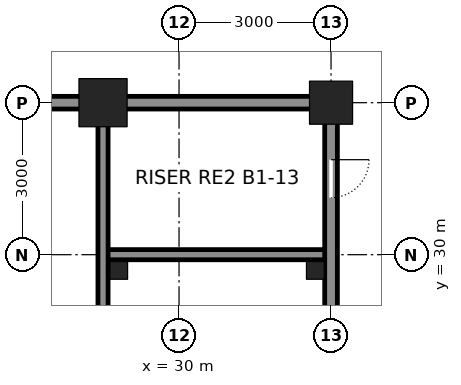
"""IFC4 building model, lengths in metres.
Left out: names, types, materials, properties, quantities, classifications, styles, units other than length and angle.
Written with IfcOpenShell. Run it as: python <this file> out.ifc"""

import sys

from ifc_helpers import new_model, si_unit, direction, frame, frame_2d, origin, origin_2d, place, context, subcontext, project, spatial, rectangle, hollow_rectangle, extrude, element, fill, save


model = new_model("IFC4")
c1 = context("Model", 3, precision=1e-05, world=origin(), true_north=direction((0.0, 1.0)))
c2 = subcontext(c1, "Body", "Model", "MODEL_VIEW")
j1 = project(units=[si_unit("LENGTHUNIT", "METRE"), si_unit("PLANEANGLEUNIT", "RADIAN")], contexts=[c1])
p1 = place(None, origin())
s1 = spatial("IfcSite", under=j1, at=p1, CompositionType="ELEMENT")
p2 = place(p1, origin())
s2 = spatial("IfcBuilding", under=s1, at=p2, CompositionType="ELEMENT")
p3 = place(p2, frame((0.0, 0.0, -5.0)))
s3 = spatial("IfcBuildingStorey", under=s2, at=p3, CompositionType="ELEMENT", Elevation=-5.0)
p4 = place(p3, frame((28.5, 33.0, -0.3), z_axis=(0.0, 0.0, 1.0), x_axis=(1.0, 0.0, 0.0)))
e1 = element("IfcColumn", 1, at=p4, inside=s3, PredefinedType="COLUMN", context=c2, shape_type="SweptSolid", body=[
    extrude(hollow_rectangle(XDim=0.95, YDim=0.95, WallThickness=0.095, at=origin_2d()), origin(), (0.0, 0.0, 1.0), 5.3),
])
p5 = place(p3, frame((33.0, 33.0, -0.3), z_axis=(0.0, 0.0, 1.0), x_axis=(1.0, 0.0, 0.0)))
e2 = element("IfcColumn", 2, at=p5, inside=s3, PredefinedType="COLUMN", context=c2, shape_type="SweptSolid", body=[
    extrude(hollow_rectangle(XDim=0.85, YDim=0.85, WallThickness=0.085, at=origin_2d()), origin(), (0.0, 0.0, 1.0), 5.3),
])
p6 = place(p3, frame((28.5, 30.0, 0.0), z_axis=(0.0, 0.0, 1.0), x_axis=(1.0, 0.0, 0.0)))
e3 = element("IfcWall", 3, at=p6, inside=s3, PredefinedType="SOLIDWALL", context=c2, shape_type="SweptSolid", body=[
    extrude(rectangle(XDim=4.5, YDim=0.2, at=frame_2d((2.25, 0.0))), origin(), (0.0, 0.0, 1.0), 4.8),
])
p7 = place(p3, frame((25.75, 33.0, 0.0), z_axis=(0.0, 0.0, 1.0), x_axis=(1.0, 0.0, 0.0)))
e4 = element("IfcWall", 4, at=p7, inside=s3, PredefinedType="SOLIDWALL", context=c2, shape_type="SweptSolid", body=[
    extrude(rectangle(XDim=2.5, YDim=0.25, at=frame_2d((1.25, 0.0))), origin(), (0.0, 0.0, 1.0), 3.941),
])
p8 = place(p3, frame((28.75, 33.0, 0.0), z_axis=(0.0, 0.0, 1.0), x_axis=(1.0, 0.0, 0.0)))
e5 = element("IfcWall", 5, at=p8, inside=s3, PredefinedType="SOLIDWALL", context=c2, shape_type="SweptSolid", body=[
    extrude(rectangle(XDim=4.0, YDim=0.25, at=frame_2d((2.0, 0.0))), origin(), (0.0, 0.0, 1.0), 3.941),
])
p9 = place(p3, frame((28.5, 24.25, 0.0), z_axis=(0.0, 0.0, 1.0), x_axis=(0.0, 1.0, 0.0)))
e6 = element("IfcWall", 6, at=p9, inside=s3, PredefinedType="SOLIDWALL", context=c2, shape_type="SweptSolid", body=[
    extrude(rectangle(XDim=8.5, YDim=0.2, at=frame_2d((4.25, 0.0))), origin(), (0.0, 0.0, 1.0), 3.873),
])
p10 = place(p3, frame((33.0, 24.25, 0.0), z_axis=(0.0, 0.0, 1.0), x_axis=(0.0, 1.0, 0.0)))
e7 = element("IfcWall", 7, at=p10, inside=s3, PredefinedType="SOLIDWALL", context=c2, shape_type="SweptSolid", body=[
    extrude(rectangle(XDim=8.5, YDim=0.25, at=frame_2d((4.25, 0.0))), origin(), (0.0, 0.0, 1.0), 3.873),
])
p11 = place(p10, frame((6.875, 0.0, 0.0)))
e8 = element("IfcOpeningElement", 8, at=p11, cuts=e7, PredefinedType="OPENING", context=c2, shape_type="SweptSolid", body=[
    extrude(rectangle(XDim=0.75, YDim=2.1, at=frame_2d((0.375, 1.05))), frame((0.0, 0.135, 0.0), z_axis=(0.0, -1.0, 0.0), x_axis=(1.0, 0.0, 0.0)), (0.0, 0.0, 1.0), 0.27),
])
for number, where, z_axis, x_axis in (
    (9, (28.81, 29.69, -0.3), (0.0, 0.0, 1.0), (1.0, 0.0, 0.0)),
    (10, (32.69, 29.69, -0.3), (0.0, 0.0, 1.0), (1.0, 0.0, 0.0)),
):
    element("IfcColumn", number, at=place(p3, frame(where, z_axis=z_axis, x_axis=x_axis)), inside=s3, PredefinedType="COLUMN", context=c2, shape_type="SweptSolid", body=[
        extrude(hollow_rectangle(XDim=0.35, YDim=0.35, WallThickness=0.035, at=origin_2d()), origin(), (0.0, 0.0, 1.0), 5.3),
    ])
p12 = place(p11, frame((0.75, 0.0, 0.0), z_axis=(0.0, 0.0, 1.0), x_axis=(-1.0, 0.0, 0.0)))
e11 = element("IfcDoor", 11, at=p12, inside=s3, OperationType="SINGLE_SWING_LEFT", PredefinedType="DOOR", context=c2, shape_type="SweptSolid", body=[
    extrude(rectangle(XDim=0.75, YDim=2.1, at=frame_2d((0.375, 1.05))), frame((0.0, 0.025, 0.0), z_axis=(0.0, -1.0, 0.0), x_axis=(1.0, 0.0, 0.0)), (0.0, 0.0, 1.0), 0.05),
])
fill(e8, e11)
save(model, sys.argv[1])
